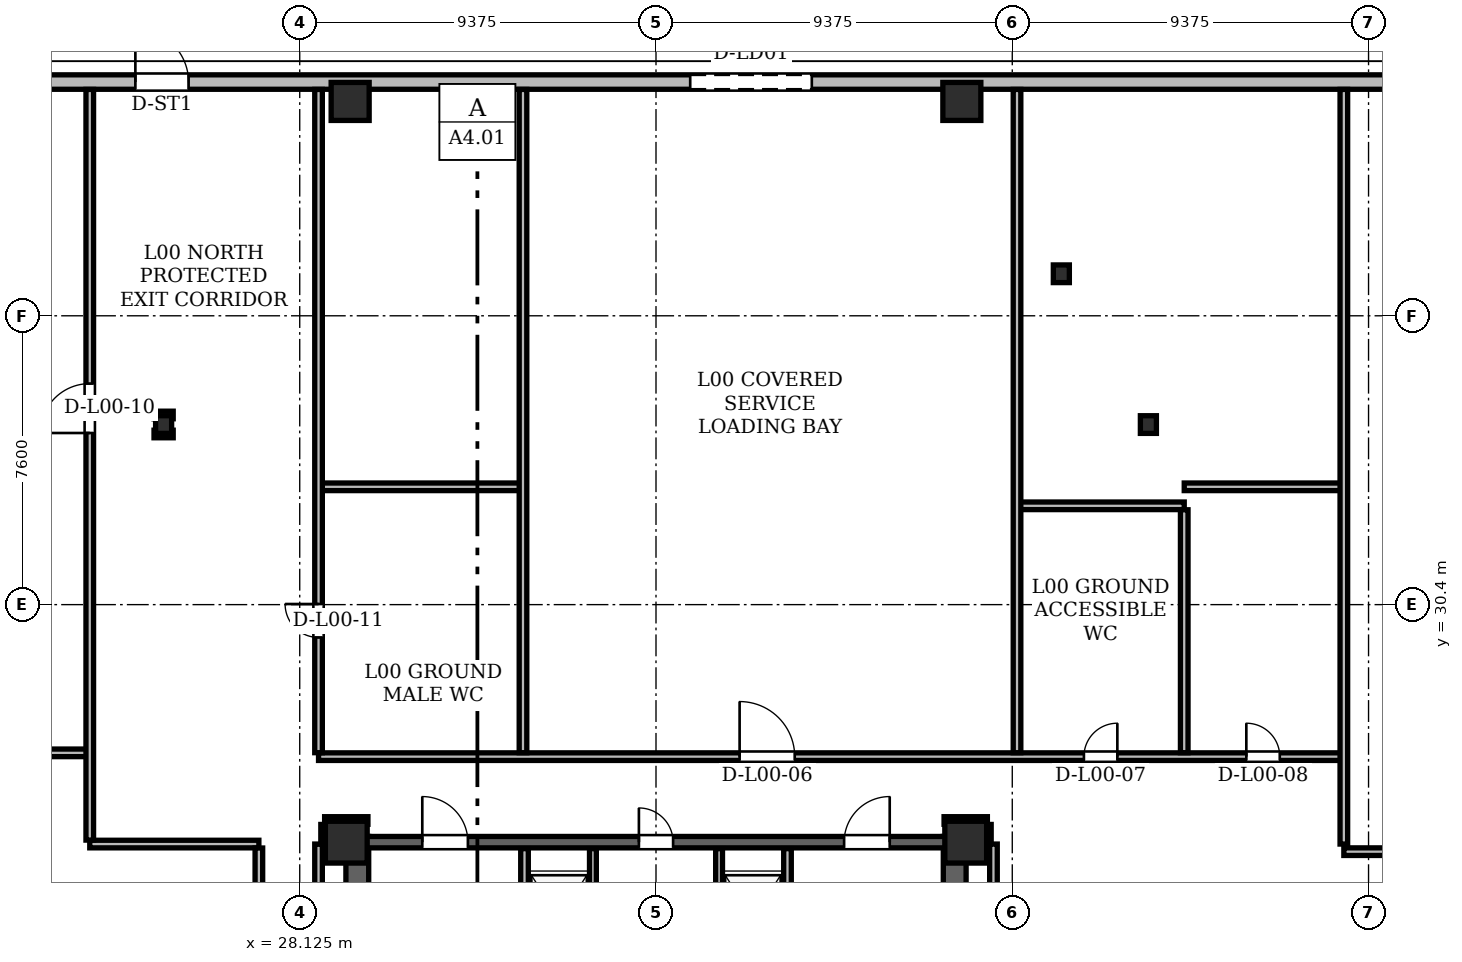
"""IFC4 building model, lengths in metres.
Left out: names, types, materials, properties, quantities, classifications, styles, units other than length and angle.
Written with IfcOpenShell. Run it as: python <this file> out.ifc"""

import sys

from ifc_helpers import new_model, si_unit, direction, frame, frame_2d, origin, origin_2d, place, context, subcontext, project, spatial, rectangle, hollow_rectangle, i_section, extrude, element, fill, save


model = new_model("IFC4")
c1 = context("Model", 3, precision=1e-05, world=origin(), true_north=direction((0.0, 1.0)))
c2 = subcontext(c1, "Body", "Model", "MODEL_VIEW")
j1 = project(units=[si_unit("LENGTHUNIT", "METRE"), si_unit("PLANEANGLEUNIT", "RADIAN")], contexts=[c1])
p1 = place(None, origin())
s1 = spatial("IfcSite", under=j1, at=p1, CompositionType="ELEMENT")
p2 = place(p1, origin())
s2 = spatial("IfcBuilding", under=s1, at=p2, CompositionType="ELEMENT")
p3 = place(p2, origin())
s3 = spatial("IfcBuildingStorey", under=s2, at=p3, CompositionType="ELEMENT", Elevation=0.0)
for number, where, z_axis, x_axis in (
    (1, (45.65, 24.15, 0.0), (0.0, 0.0, 1.0), (1.0, 0.0, 0.0)),
    (2, (29.35, 24.15, 0.0), (0.0, 0.0, 1.0), (1.0, 0.0, 0.0)),
):
    element("IfcColumn", number, at=place(p3, frame(where, z_axis=z_axis, x_axis=x_axis)), inside=s3, PredefinedType="COLUMN", context=c2, shape_type="SweptSolid", body=[
        extrude(hollow_rectangle(XDim=1.1, YDim=1.1, WallThickness=0.09, at=origin_2d()), origin(), (0.0, 0.0, 1.0), 5.4),
    ])
for number, where, z_axis, x_axis in (
    (3, (45.548, 43.64, 0.004), (0.0, 0.0, 1.0), (1.0, 0.0, 0.0)),
    (4, (29.452, 43.64, 0.004), (0.0, 0.0, 1.0), (1.0, 0.0, 0.0)),
):
    element("IfcColumn", number, at=place(p3, frame(where, z_axis=z_axis, x_axis=x_axis)), inside=s3, PredefinedType="COLUMN", context=c2, shape_type="SweptSolid", body=[
        extrude(hollow_rectangle(XDim=1.0, YDim=1.0, WallThickness=0.085, at=origin_2d()), origin(), (0.0, 0.0, 1.0), 5.391),
    ])
for number, where, z_axis, x_axis in (
    (5, (50.457, 35.138, 0.004), (0.0, 0.0, 1.0), (1.0, 0.0, 0.0)),
    (6, (48.166, 39.106, 0.004), (0.0, 0.0, 1.0), (1.0, 0.0, 0.0)),
    (7, (26.834, 39.106, 0.004), (0.0, 0.0, 1.0), (1.0, 0.0, 0.0)),
    (8, (24.543, 35.138, 0.004), (0.0, 0.0, 1.0), (1.0, 0.0, 0.0)),
):
    element("IfcColumn", number, at=place(p3, frame(where, z_axis=z_axis, x_axis=x_axis)), inside=s3, PredefinedType="COLUMN", context=c2, shape_type="SweptSolid", body=[
        extrude(i_section(OverallWidth=0.422, OverallDepth=0.465, WebThickness=0.045, FlangeThickness=0.072, at=origin_2d()), origin(), (0.0, 0.0, 1.0), 5.391),
    ])
for number, where, z_axis, x_axis in (
    (9, (29.64, 11.0, 0.0), (0.0, 0.0, 1.0), (0.0, 1.0, 0.0)),
    (10, (45.36, 11.0, 0.0), (0.0, 0.0, 1.0), (0.0, 1.0, 0.0)),
):
    element("IfcWall", number, at=place(p3, frame(where, z_axis=z_axis, x_axis=x_axis)), inside=s3, PredefinedType="SHEAR", context=c2, shape_type="SweptSolid", body=[
        extrude(rectangle(XDim=13.3, YDim=0.6, at=frame_2d((6.65, 0.0))), origin(), (0.0, 0.0, 1.0), 5.12),
    ])
p4 = place(p3, frame((29.65, 24.15, 0.0), z_axis=(0.0, 0.0, 1.0), x_axis=(1.0, 0.0, 0.0)))
e11 = element("IfcWall", 11, at=p4, inside=s3, PredefinedType="SHEAR", context=c2, shape_type="SweptSolid", body=[
    extrude(rectangle(XDim=15.7, YDim=0.3, at=frame_2d((7.85, 0.0))), origin(), (0.0, 0.0, 1.0), 5.12),
])
p5 = place(p4, frame((1.7, 0.0, 0.0)))
e12 = element("IfcOpeningElement", 12, at=p5, cuts=e11, PredefinedType="OPENING", context=c2, shape_type="SweptSolid", body=[
    extrude(rectangle(XDim=1.2, YDim=2.2, at=frame_2d((0.6, 1.1))), frame((0.0, 0.15, 0.0), z_axis=(0.0, -1.0, 0.0), x_axis=(1.0, 0.0, 0.0)), (0.0, 0.0, 1.0), 0.3),
])
p6 = place(p4, frame((12.8, 0.0, 0.0)))
e13 = element("IfcOpeningElement", 13, at=p6, cuts=e11, PredefinedType="OPENING", context=c2, shape_type="SweptSolid", body=[
    extrude(rectangle(XDim=1.2, YDim=2.2, at=frame_2d((0.6, 1.1))), frame((0.0, 0.15, 0.0), z_axis=(0.0, -1.0, 0.0), x_axis=(1.0, 0.0, 0.0)), (0.0, 0.0, 1.0), 0.3),
])
p7 = place(p4, frame((7.4, 0.0, 0.0)))
e14 = element("IfcOpeningElement", 14, at=p7, cuts=e11, PredefinedType="OPENING", context=c2, shape_type="SweptSolid", body=[
    extrude(rectangle(XDim=0.9, YDim=2.05, at=frame_2d((0.45, 1.025))), frame((0.0, 0.15, 0.0), z_axis=(0.0, -1.0, 0.0), x_axis=(1.0, 0.0, 0.0)), (0.0, 0.0, 1.0), 0.3),
])
p8 = place(p3, frame((-1.072, 44.15, 0.0), z_axis=(0.0, 0.0, 1.0), x_axis=(1.0, 0.0, 0.0)))
e15 = element("IfcWall", 15, at=p8, inside=s3, PredefinedType="SOLIDWALL", context=c2, shape_type="SweptSolid", body=[
    extrude(rectangle(XDim=77.145, YDim=0.38, at=frame_2d((38.572, 0.0))), origin(), (0.0, 0.0, 1.0), 5.12),
])
p9 = place(p8, frame((24.872, 0.0, 0.0)))
e16 = element("IfcOpeningElement", 16, at=p9, cuts=e15, PredefinedType="OPENING", context=c2, shape_type="SweptSolid", body=[
    extrude(rectangle(XDim=1.4, YDim=2.2, at=frame_2d((0.7, 1.1))), frame((0.0, 0.19, 0.0), z_axis=(0.0, -1.0, 0.0), x_axis=(1.0, 0.0, 0.0)), (0.0, 0.0, 1.0), 0.38),
])
p10 = place(p8, frame((39.472, 0.0, 0.0)))
e17 = element("IfcOpeningElement", 17, at=p10, cuts=e15, PredefinedType="OPENING", context=c2, shape_type="SweptSolid", body=[
    extrude(rectangle(XDim=3.2, YDim=3.0, at=frame_2d((1.6, 1.5))), frame((0.0, 0.19, 0.0), z_axis=(0.0, -1.0, 0.0), x_axis=(1.0, 0.0, 0.0)), (0.0, 0.0, 1.0), 0.38),
])
p11 = place(p3, frame((34.04, 19.48, 0.0), z_axis=(0.0, 0.0, 1.0), x_axis=(0.0, 1.0, 0.0)))
e18 = element("IfcWall", 18, at=p11, inside=s3, PredefinedType="PARTITIONING", context=c2, shape_type="SweptSolid", body=[
    extrude(rectangle(XDim=4.5, YDim=0.2, at=frame_2d((2.25, 0.0))), origin(), (0.0, 0.0, 1.0), 4.16),
])
p12 = place(p11, frame((2.12, 0.0, 0.0)))
e19 = element("IfcOpeningElement", 19, at=p12, cuts=e18, PredefinedType="OPENING", context=c2, shape_type="SweptSolid", body=[
    extrude(rectangle(XDim=1.1, YDim=2.2, at=frame_2d((0.55, 1.1))), frame((0.0, 0.1, 0.0), z_axis=(0.0, -1.0, 0.0), x_axis=(1.0, 0.0, 0.0)), (0.0, 0.0, 1.0), 0.2),
])
p13 = place(p3, frame((35.84, 20.96, 0.0), z_axis=(0.0, 0.0, 1.0), x_axis=(0.0, 1.0, 0.0)))
e20 = element("IfcWall", 20, at=p13, inside=s3, PredefinedType="PARTITIONING", context=c2, shape_type="SweptSolid", body=[
    extrude(rectangle(XDim=3.02, YDim=0.18, at=frame_2d((1.51, 0.0))), origin(), (0.0, 0.0, 1.0), 4.16),
])
p14 = place(p3, frame((40.96, 19.48, 0.0), z_axis=(0.0, 0.0, 1.0), x_axis=(0.0, 1.0, 0.0)))
e21 = element("IfcWall", 21, at=p14, inside=s3, PredefinedType="PARTITIONING", context=c2, shape_type="SweptSolid", body=[
    extrude(rectangle(XDim=4.5, YDim=0.2, at=frame_2d((2.25, 0.0))), origin(), (0.0, 0.0, 1.0), 4.16),
])
p15 = place(p14, frame((2.12, 0.0, 0.0)))
e22 = element("IfcOpeningElement", 22, at=p15, cuts=e21, PredefinedType="OPENING", context=c2, shape_type="SweptSolid", body=[
    extrude(rectangle(XDim=1.1, YDim=2.2, at=frame_2d((0.55, 1.1))), frame((0.0, 0.1, 0.0), z_axis=(0.0, -1.0, 0.0), x_axis=(1.0, 0.0, 0.0)), (0.0, 0.0, 1.0), 0.2),
])
p16 = place(p3, frame((39.16, 20.96, 0.0), z_axis=(0.0, 0.0, 1.0), x_axis=(0.0, 1.0, 0.0)))
e23 = element("IfcWall", 23, at=p16, inside=s3, PredefinedType="PARTITIONING", context=c2, shape_type="SweptSolid", body=[
    extrude(rectangle(XDim=3.02, YDim=0.18, at=frame_2d((1.51, 0.0))), origin(), (0.0, 0.0, 1.0), 4.16),
])
p17 = place(p3, frame((55.6, 23.9, 0.0), z_axis=(0.0, 0.0, 1.0), x_axis=(1.0, 0.0, 0.0)))
e24 = element("IfcWall", 24, at=p17, inside=s3, PredefinedType="PARTITIONING", context=c2, shape_type="SweptSolid", body=[
    extrude(rectangle(XDim=1.149, YDim=0.2, at=frame_2d((0.575, 0.0))), origin(), (0.0, 0.0, 1.0), 5.12),
])
p18 = place(p3, frame((22.6, 24.1, 0.0), z_axis=(0.0, 0.0, 1.0), x_axis=(1.0, 0.0, 0.0)))
e25 = element("IfcWall", 25, at=p18, inside=s3, PredefinedType="PARTITIONING", context=c2, shape_type="SweptSolid", body=[
    extrude(rectangle(XDim=4.45, YDim=0.2, at=frame_2d((2.225, 0.0))), origin(), (0.0, 0.0, 1.0), 5.12),
])
for number, where, z_axis, x_axis in (
    (26, (28.78, 24.72, 0.0), (0.0, 0.0, 1.0), (1.0, 0.0, 0.0)),
    (27, (45.08, 24.72, 0.0), (0.0, 0.0, 1.0), (1.0, 0.0, 0.0)),
):
    element("IfcWall", number, at=place(p3, frame(where, z_axis=z_axis, x_axis=x_axis)), inside=s3, PredefinedType="PARTITIONING", context=c2, shape_type="SweptSolid", body=[
        extrude(rectangle(XDim=1.14, YDim=0.2, at=frame_2d((0.57, 0.0))), origin(), (0.0, 0.0, 1.0), 4.183),
    ])
p19 = place(p3, frame((28.62, 26.4, 0.0), z_axis=(0.0, 0.0, 1.0), x_axis=(1.0, 0.0, 0.0)))
e28 = element("IfcWall", 28, at=p19, inside=s3, PredefinedType="PARTITIONING", context=c2, shape_type="SweptSolid", body=[
    extrude(rectangle(XDim=26.98, YDim=0.2, at=frame_2d((13.49, 0.0))), origin(), (0.0, 0.0, 1.0), 4.183),
])
p20 = place(p19, frame((11.08, 0.0, 0.0)))
e29 = element("IfcOpeningElement", 29, at=p20, cuts=e28, PredefinedType="OPENING", context=c2, shape_type="SweptSolid", body=[
    extrude(rectangle(XDim=1.45, YDim=2.25, at=frame_2d((0.725, 1.125))), frame((0.0, 0.1, 0.0), z_axis=(0.0, -1.0, 0.0), x_axis=(1.0, 0.0, 0.0)), (0.0, 0.0, 1.0), 0.2),
])
p21 = place(p19, frame((20.14, 0.0, 0.0)))
e30 = element("IfcOpeningElement", 30, at=p21, cuts=e28, PredefinedType="OPENING", context=c2, shape_type="SweptSolid", body=[
    extrude(rectangle(XDim=0.88, YDim=2.08, at=frame_2d((0.44, 1.04))), frame((0.0, 0.1, 0.0), z_axis=(0.0, -1.0, 0.0), x_axis=(1.0, 0.0, 0.0)), (0.0, 0.0, 1.0), 0.2),
])
p22 = place(p19, frame((24.414, 0.0, 0.0)))
e31 = element("IfcOpeningElement", 31, at=p22, cuts=e28, PredefinedType="OPENING", context=c2, shape_type="SweptSolid", body=[
    extrude(rectangle(XDim=0.88, YDim=2.08, at=frame_2d((0.44, 1.04))), frame((0.0, 0.1, 0.0), z_axis=(0.0, -1.0, 0.0), x_axis=(1.0, 0.0, 0.0)), (0.0, 0.0, 1.0), 0.2),
])
p23 = place(p3, frame((-2.756, 26.5, 0.0), z_axis=(0.0, 0.0, 1.0), x_axis=(1.0, 0.0, 0.0)))
e32 = element("IfcWall", 32, at=p23, inside=s3, PredefinedType="PARTITIONING", context=c2, shape_type="SweptSolid", body=[
    extrude(rectangle(XDim=25.356, YDim=0.2, at=frame_2d((12.678, 0.0))), origin(), (0.0, 0.0, 1.0), 4.183),
])
p24 = place(p3, frame((47.0, 33.0, 0.0), z_axis=(0.0, 0.0, 1.0), x_axis=(1.0, 0.0, 0.0)))
e33 = element("IfcWall", 33, at=p24, inside=s3, PredefinedType="PARTITIONING", context=c2, shape_type="SweptSolid", body=[
    extrude(rectangle(XDim=4.4, YDim=0.2, at=frame_2d((2.2, 0.0))), origin(), (0.0, 0.0, 1.0), 5.12),
])
p25 = place(p3, frame((28.56, 33.5, 0.0), z_axis=(0.0, 0.0, 1.0), x_axis=(1.0, 0.0, 0.0)))
e34 = element("IfcWall", 34, at=p25, inside=s3, PredefinedType="PARTITIONING", context=c2, shape_type="SweptSolid", body=[
    extrude(rectangle(XDim=5.44, YDim=0.2, at=frame_2d((2.72, 0.0))), origin(), (0.0, 0.0, 1.0), 4.183),
])
p26 = place(p3, frame((51.4, 33.5, 0.0), z_axis=(0.0, 0.0, 1.0), x_axis=(1.0, 0.0, 0.0)))
e35 = element("IfcWall", 35, at=p26, inside=s3, PredefinedType="PARTITIONING", context=c2, shape_type="SweptSolid", body=[
    extrude(rectangle(XDim=4.2, YDim=0.2, at=frame_2d((2.1, 0.0))), origin(), (0.0, 0.0, 1.0), 4.254),
])
for number, where, z_axis, x_axis in (
    (36, (24.291, 34.89, 0.0), (0.0, 0.0, 1.0), (1.0, 0.0, 0.0)),
    (37, (24.291, 35.39, 0.0), (0.0, 0.0, 1.0), (1.0, 0.0, 0.0)),
):
    element("IfcWall", number, at=place(p3, frame(where, z_axis=z_axis, x_axis=x_axis)), inside=s3, PredefinedType="PARTITIONING", context=c2, shape_type="SweptSolid", body=[
        extrude(rectangle(XDim=0.505, YDim=0.2, at=frame_2d((0.252, 0.0))), origin(), (0.0, 0.0, 1.0), 4.254),
    ])
for number, where, z_axis, x_axis in (
    (38, (26.581, 38.85, 0.0), (0.0, 0.0, 1.0), (1.0, 0.0, 0.0)),
    (39, (26.581, 39.36, 0.0), (0.0, 0.0, 1.0), (1.0, 0.0, 0.0)),
):
    element("IfcWall", number, at=place(p3, frame(where, z_axis=z_axis, x_axis=x_axis)), inside=s3, PredefinedType="PARTITIONING", context=c2, shape_type="SweptSolid", body=[
        extrude(rectangle(XDim=0.505, YDim=0.2, at=frame_2d((0.252, 0.0))), origin(), (0.0, 0.0, 1.0), 3.91),
    ])
p27 = place(p3, frame((22.6, 24.204, 0.0), z_axis=(0.0, 0.0, 1.0), x_axis=(0.0, 1.0, 0.0)))
e40 = element("IfcWall", 40, at=p27, inside=s3, PredefinedType="PARTITIONING", context=c2, shape_type="SweptSolid", body=[
    extrude(rectangle(XDim=19.752, YDim=0.2, at=frame_2d((9.876, 0.0))), origin(), (0.0, 0.0, 1.0), 3.91),
])
p28 = place(p27, frame((10.712, 0.0, 0.0)))
e41 = element("IfcOpeningElement", 41, at=p28, cuts=e40, PredefinedType="OPENING", context=c2, shape_type="SweptSolid", body=[
    extrude(rectangle(XDim=1.3, YDim=2.2, at=frame_2d((0.65, 1.1))), frame((0.0, 0.1, 0.0), z_axis=(0.0, -1.0, 0.0), x_axis=(1.0, 0.0, 0.0)), (0.0, 0.0, 1.0), 0.2),
])
p29 = place(p3, frame((27.05, 10.504, 0.0), z_axis=(0.0, 0.0, 1.0), x_axis=(0.0, 1.0, 0.0)))
e42 = element("IfcWall", 42, at=p29, inside=s3, PredefinedType="PARTITIONING", context=c2, shape_type="SweptSolid", body=[
    extrude(rectangle(XDim=13.492, YDim=0.2, at=frame_2d((6.746, 0.0))), origin(), (0.0, 0.0, 1.0), 4.183),
])
p30 = place(p3, frame((28.62, 10.504, 0.0), z_axis=(0.0, 0.0, 1.0), x_axis=(0.0, 1.0, 0.0)))
e43 = element("IfcWall", 43, at=p30, inside=s3, PredefinedType="PARTITIONING", context=c2, shape_type="SweptSolid", body=[
    extrude(rectangle(XDim=13.596, YDim=0.2, at=frame_2d((6.798, 0.0))), origin(), (0.0, 0.0, 1.0), 4.183),
])
p31 = place(p3, frame((28.62, 26.504, 0.0), z_axis=(0.0, 0.0, 1.0), x_axis=(0.0, 1.0, 0.0)))
e44 = element("IfcWall", 44, at=p31, inside=s3, PredefinedType="PARTITIONING", context=c2, shape_type="SweptSolid", body=[
    extrude(rectangle(XDim=17.452, YDim=0.2, at=frame_2d((8.726, 0.0))), origin(), (0.0, 0.0, 1.0), 4.254),
])
p32 = place(p31, frame((3.032, 0.0, 0.0)))
e45 = element("IfcOpeningElement", 45, at=p32, cuts=e44, PredefinedType="OPENING", context=c2, shape_type="SweptSolid", body=[
    extrude(rectangle(XDim=0.88, YDim=2.08, at=frame_2d((0.44, 1.04))), frame((0.0, 0.1, 0.0), z_axis=(0.0, -1.0, 0.0), x_axis=(1.0, 0.0, 0.0)), (0.0, 0.0, 1.0), 0.2),
])
p33 = place(p3, frame((28.78, 24.1, 0.0), z_axis=(0.0, 0.0, 1.0), x_axis=(0.0, 1.0, 0.0)))
e46 = element("IfcWall", 46, at=p33, inside=s3, PredefinedType="PARTITIONING", context=c2, shape_type="SweptSolid", body=[
    extrude(rectangle(XDim=0.516, YDim=0.2, at=frame_2d((0.258, 0.0))), origin(), (0.0, 0.0, 1.0), 5.12),
])
p34 = place(p3, frame((34.0, 26.504, 0.0), z_axis=(0.0, 0.0, 1.0), x_axis=(0.0, 1.0, 0.0)))
e47 = element("IfcWall", 47, at=p34, inside=s3, PredefinedType="PARTITIONING", context=c2, shape_type="SweptSolid", body=[
    extrude(rectangle(XDim=17.452, YDim=0.2, at=frame_2d((8.726, 0.0))), origin(), (0.0, 0.0, 1.0), 4.254),
])
p35 = place(p3, frame((46.22, 24.1, 0.0), z_axis=(0.0, 0.0, 1.0), x_axis=(0.0, 1.0, 0.0)))
e48 = element("IfcWall", 48, at=p35, inside=s3, PredefinedType="PARTITIONING", context=c2, shape_type="SweptSolid", body=[
    extrude(rectangle(XDim=0.516, YDim=0.2, at=frame_2d((0.258, 0.0))), origin(), (0.0, 0.0, 1.0), 5.12),
])
p36 = place(p3, frame((46.38, 10.504, 0.0), z_axis=(0.0, 0.0, 1.0), x_axis=(0.0, 1.0, 0.0)))
e49 = element("IfcWall", 49, at=p36, inside=s3, PredefinedType="PARTITIONING", context=c2, shape_type="SweptSolid", body=[
    extrude(rectangle(XDim=13.596, YDim=0.2, at=frame_2d((6.798, 0.0))), origin(), (0.0, 0.0, 1.0), 5.12),
])
p37 = place(p3, frame((47.0, 26.504, 0.0), z_axis=(0.0, 0.0, 1.0), x_axis=(0.0, 1.0, 0.0)))
e50 = element("IfcWall", 50, at=p37, inside=s3, PredefinedType="PARTITIONING", context=c2, shape_type="SweptSolid", body=[
    extrude(rectangle(XDim=17.452, YDim=0.2, at=frame_2d((8.726, 0.0))), origin(), (0.0, 0.0, 1.0), 4.254),
])
p38 = place(p3, frame((51.4, 26.504, 0.0), z_axis=(0.0, 0.0, 1.0), x_axis=(0.0, 1.0, 0.0)))
e51 = element("IfcWall", 51, at=p38, inside=s3, PredefinedType="PARTITIONING", context=c2, shape_type="SweptSolid", body=[
    extrude(rectangle(XDim=6.392, YDim=0.2, at=frame_2d((3.196, 0.0))), origin(), (0.0, 0.0, 1.0), 5.12),
])
p39 = place(p3, frame((55.6, 24.1, 0.0), z_axis=(0.0, 0.0, 1.0), x_axis=(0.0, 1.0, 0.0)))
e52 = element("IfcWall", 52, at=p39, inside=s3, PredefinedType="PARTITIONING", context=c2, shape_type="SweptSolid", body=[
    extrude(rectangle(XDim=19.856, YDim=0.2, at=frame_2d((9.928, 0.0))), origin(), (0.0, 0.0, 1.0), 3.91),
])
p40 = place(p9, origin())
e53 = element("IfcDoor", 53, at=p40, inside=s3, OperationType="SINGLE_SWING_LEFT", PredefinedType="DOOR", context=c2, shape_type="SweptSolid", body=[
    extrude(rectangle(XDim=1.4, YDim=2.2, at=frame_2d((0.7, 1.1))), frame((0.0, 0.025, 0.0), z_axis=(0.0, -1.0, 0.0), x_axis=(1.0, 0.0, 0.0)), (0.0, 0.0, 1.0), 0.05),
])
fill(e16, e53)
p41 = place(p10, origin())
e54 = element("IfcDoor", 54, at=p41, inside=s3, OperationType="ROLLINGUP", PredefinedType="GATE", context=c2, shape_type="SweptSolid", body=[
    extrude(rectangle(XDim=3.2, YDim=3.0, at=frame_2d((1.6, 1.5))), frame((0.0, 0.025, 0.0), z_axis=(0.0, -1.0, 0.0), x_axis=(1.0, 0.0, 0.0)), (0.0, 0.0, 1.0), 0.05),
])
fill(e17, e54)
p42 = place(p5, origin())
e55 = element("IfcDoor", 55, at=p42, inside=s3, OperationType="SINGLE_SWING_LEFT", PredefinedType="DOOR", context=c2, shape_type="SweptSolid", body=[
    extrude(rectangle(XDim=1.2, YDim=2.2, at=frame_2d((0.6, 1.1))), frame((0.0, 0.025, 0.0), z_axis=(0.0, -1.0, 0.0), x_axis=(1.0, 0.0, 0.0)), (0.0, 0.0, 1.0), 0.05),
])
fill(e12, e55)
p43 = place(p6, origin())
e56 = element("IfcDoor", 56, at=p43, inside=s3, OperationType="SINGLE_SWING_RIGHT", PredefinedType="DOOR", context=c2, shape_type="SweptSolid", body=[
    extrude(rectangle(XDim=1.2, YDim=2.2, at=frame_2d((0.6, 1.1))), frame((0.0, 0.025, 0.0), z_axis=(0.0, -1.0, 0.0), x_axis=(1.0, 0.0, 0.0)), (0.0, 0.0, 1.0), 0.05),
])
fill(e13, e56)
p44 = place(p7, origin())
e57 = element("IfcDoor", 57, at=p44, inside=s3, OperationType="SINGLE_SWING_LEFT", PredefinedType="DOOR", context=c2, shape_type="SweptSolid", body=[
    extrude(rectangle(XDim=0.9, YDim=2.05, at=frame_2d((0.45, 1.025))), frame((0.0, 0.025, 0.0), z_axis=(0.0, -1.0, 0.0), x_axis=(1.0, 0.0, 0.0)), (0.0, 0.0, 1.0), 0.05),
])
fill(e14, e57)
p45 = place(p20, origin())
e58 = element("IfcDoor", 58, at=p45, inside=s3, OperationType="SINGLE_SWING_LEFT", PredefinedType="DOOR", context=c2, shape_type="SweptSolid", body=[
    extrude(rectangle(XDim=1.45, YDim=2.25, at=frame_2d((0.725, 1.125))), frame((0.0, 0.025, 0.0), z_axis=(0.0, -1.0, 0.0), x_axis=(1.0, 0.0, 0.0)), (0.0, 0.0, 1.0), 0.05),
])
fill(e29, e58)
p46 = place(p21, origin())
e59 = element("IfcDoor", 59, at=p46, inside=s3, OperationType="SINGLE_SWING_RIGHT", PredefinedType="DOOR", context=c2, shape_type="SweptSolid", body=[
    extrude(rectangle(XDim=0.88, YDim=2.08, at=frame_2d((0.44, 1.04))), frame((0.0, 0.025, 0.0), z_axis=(0.0, -1.0, 0.0), x_axis=(1.0, 0.0, 0.0)), (0.0, 0.0, 1.0), 0.05),
])
fill(e30, e59)
p47 = place(p22, origin())
e60 = element("IfcDoor", 60, at=p47, inside=s3, OperationType="SINGLE_SWING_LEFT", PredefinedType="DOOR", context=c2, shape_type="SweptSolid", body=[
    extrude(rectangle(XDim=0.88, YDim=2.08, at=frame_2d((0.44, 1.04))), frame((0.0, 0.025, 0.0), z_axis=(0.0, -1.0, 0.0), x_axis=(1.0, 0.0, 0.0)), (0.0, 0.0, 1.0), 0.05),
])
fill(e31, e60)
p48 = place(p28, origin())
e61 = element("IfcDoor", 61, at=p48, inside=s3, OperationType="SINGLE_SWING_LEFT", PredefinedType="DOOR", context=c2, shape_type="SweptSolid", body=[
    extrude(rectangle(XDim=1.3, YDim=2.2, at=frame_2d((0.65, 1.1))), frame((0.0, 0.025, 0.0), z_axis=(0.0, -1.0, 0.0), x_axis=(1.0, 0.0, 0.0)), (0.0, 0.0, 1.0), 0.05),
])
fill(e41, e61)
p49 = place(p32, origin())
e62 = element("IfcDoor", 62, at=p49, inside=s3, OperationType="SINGLE_SWING_RIGHT", PredefinedType="DOOR", context=c2, shape_type="SweptSolid", body=[
    extrude(rectangle(XDim=0.88, YDim=2.08, at=frame_2d((0.44, 1.04))), frame((0.0, 0.025, 0.0), z_axis=(0.0, -1.0, 0.0), x_axis=(1.0, 0.0, 0.0)), (0.0, 0.0, 1.0), 0.05),
])
fill(e45, e62)
save(model, sys.argv[1])
